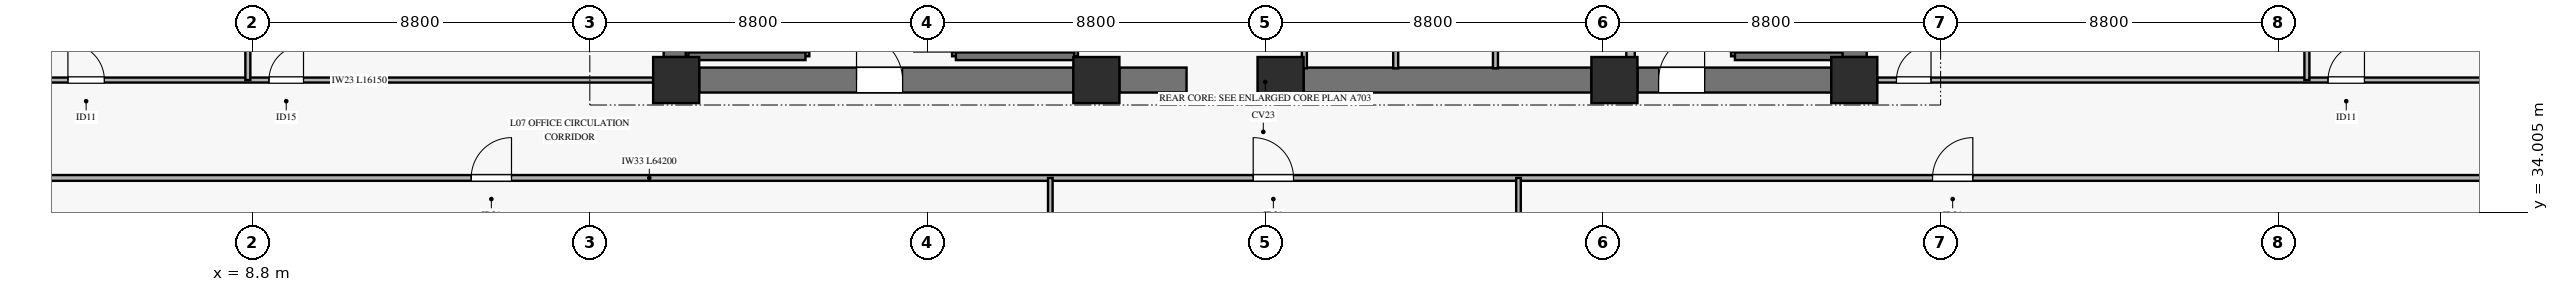
"""IFC4 building model, lengths in metres.
Left out: names, types, materials, properties, quantities, classifications, styles, units other than length and angle.
Written with IfcOpenShell. Run it as: python <this file> out.ifc"""

import sys

from ifc_helpers import new_model, si_unit, direction, frame, frame_2d, origin, origin_2d, place, context, subcontext, project, spatial, rectangle, extrude, source, transform, mapped, element, fill, save


model = new_model("IFC4")
c1 = context("Model", 3, precision=1e-05, world=origin(), true_north=direction((0.0, 1.0)))
c2 = subcontext(c1, "Body", "Model", "MODEL_VIEW")
j1 = project(units=[si_unit("LENGTHUNIT", "METRE"), si_unit("PLANEANGLEUNIT", "RADIAN")], contexts=[c1])
p1 = place(None, origin())
s1 = spatial("IfcSite", under=j1, at=p1, CompositionType="ELEMENT")
p2 = place(p1, origin())
s2 = spatial("IfcBuilding", under=s1, at=p2, CompositionType="ELEMENT")
p3 = place(p2, frame((0.0, 0.0, 29.3)))
s3 = spatial("IfcBuildingStorey", under=s2, at=p3, CompositionType="ELEMENT", Elevation=29.3)
m1 = source(origin(), c2, "Body", "SweptSolid", [
    extrude(rectangle(XDim=1.2, YDim=1.2, at=origin_2d()), origin(), (0.0, 0.0, 1.0), 3.68),
])
for number, where, z_axis, x_axis in (
    (1, (19.85, 37.45, 0.0), (0.0, 0.0, 1.0), (1.0, 0.0, 0.0)),
    (2, (30.8, 37.45, 0.0), (0.0, 0.0, 1.0), (1.0, 0.0, 0.0)),
    (3, (35.6, 37.45, 0.0), (0.0, 0.0, 1.0), (1.0, 0.0, 0.0)),
    (4, (44.3, 37.45, 0.0), (0.0, 0.0, 1.0), (1.0, 0.0, 0.0)),
    (5, (50.55, 37.45, 0.0), (0.0, 0.0, 1.0), (1.0, 0.0, 0.0)),
):
    element("IfcColumn", number, at=place(p3, frame(where, z_axis=z_axis, x_axis=x_axis)), inside=s3, PredefinedType="PILASTER", context=c2, shape_type="MappedRepresentation", body=[
        mapped(m1, transform((0.0, 0.0, 0.0), x_axis=(1.0, 0.0, 0.0), y_axis=(0.0, 1.0, 0.0), z_axis=(0.0, 0.0, 1.0), scale=1.0)),
    ])
p4 = place(p3, frame((20.45, 37.45, 0.0), z_axis=(0.0, 0.0, 1.0), x_axis=(1.0, 0.0, 0.0)))
e6 = element("IfcWall", 6, at=p4, inside=s3, PredefinedType="SHEAR", context=c2, shape_type="SweptSolid", body=[
    extrude(rectangle(XDim=9.75, YDim=0.65, at=frame_2d((4.875, 0.0))), origin(), (0.0, 0.0, 1.0), 3.68),
])
p5 = place(p4, frame((4.1, 0.0, 0.0)))
e7 = element("IfcOpeningElement", 7, at=p5, cuts=e6, PredefinedType="OPENING", context=c2, shape_type="SweptSolid", body=[
    extrude(rectangle(XDim=1.2, YDim=2.15, at=frame_2d((0.6, 1.075))), frame((0.0, 0.335, 0.0), z_axis=(0.0, -1.0, 0.0), x_axis=(1.0, 0.0, 0.0)), (0.0, 0.0, 1.0), 0.67),
])
p6 = place(p3, frame((31.4, 37.45, 0.0), z_axis=(0.0, 0.0, 1.0), x_axis=(1.0, 0.0, 0.0)))
e8 = element("IfcWall", 8, at=p6, inside=s3, PredefinedType="SHEAR", context=c2, shape_type="SweptSolid", body=[
    extrude(rectangle(XDim=1.75, YDim=0.65, at=frame_2d((0.875, 0.0))), origin(), (0.0, 0.0, 1.0), 3.68),
])
p7 = place(p3, frame((36.2, 37.45, 0.0), z_axis=(0.0, 0.0, 1.0), x_axis=(1.0, 0.0, 0.0)))
e9 = element("IfcWall", 9, at=p7, inside=s3, PredefinedType="SHEAR", context=c2, shape_type="SweptSolid", body=[
    extrude(rectangle(XDim=7.5, YDim=0.65, at=frame_2d((3.75, 0.0))), origin(), (0.0, 0.0, 1.0), 3.68),
])
p8 = place(p3, frame((44.9, 37.45, 0.0), z_axis=(0.0, 0.0, 1.0), x_axis=(1.0, 0.0, 0.0)))
e10 = element("IfcWall", 10, at=p8, inside=s3, PredefinedType="SHEAR", context=c2, shape_type="SweptSolid", body=[
    extrude(rectangle(XDim=5.05, YDim=0.65, at=frame_2d((2.525, 0.0))), origin(), (0.0, 0.0, 1.0), 3.68),
])
p9 = place(p8, frame((0.55, 0.0, 0.0)))
e11 = element("IfcOpeningElement", 11, at=p9, cuts=e10, PredefinedType="OPENING", context=c2, shape_type="SweptSolid", body=[
    extrude(rectangle(XDim=1.2, YDim=2.15, at=frame_2d((0.6, 1.075))), frame((0.0, 0.335, 0.0), z_axis=(0.0, -1.0, 0.0), x_axis=(1.0, 0.0, 0.0)), (0.0, 0.0, 1.0), 0.67),
])
for number, where, z_axis, x_axis in (
    (12, (19.85, 38.05, 0.0), (0.0, 0.0, 1.0), (0.0, 1.0, 0.0)),
    (13, (50.55, 38.05, 0.0), (0.0, 0.0, 1.0), (0.0, 1.0, 0.0)),
):
    element("IfcWall", number, at=place(p3, frame(where, z_axis=z_axis, x_axis=x_axis)), inside=s3, PredefinedType="SHEAR", context=c2, shape_type="SweptSolid", body=[
        extrude(rectangle(XDim=7.9, YDim=0.65, at=frame_2d((3.95, 0.0))), origin(), (0.0, 0.0, 1.0), 3.68),
    ])
p10 = place(p3, frame((20.17, 38.07, 0.0), z_axis=(0.0, 0.0, 1.0), x_axis=(0.0, 1.0, 0.0)))
e14 = element("IfcWall", 14, at=p10, inside=s3, PredefinedType="SOLIDWALL", context=c2, shape_type="SweptSolid", body=[
    extrude(rectangle(XDim=7.25, YDim=0.14, at=frame_2d((3.625, 0.0))), origin(), (0.0, 0.0, 1.0), 3.9),
])
p11 = place(p3, frame((23.22, 38.07, 0.0), z_axis=(0.0, 0.0, 1.0), x_axis=(0.0, 1.0, 0.0)))
e15 = element("IfcWall", 15, at=p11, inside=s3, PredefinedType="SOLIDWALL", context=c2, shape_type="SweptSolid", body=[
    extrude(rectangle(XDim=7.25, YDim=0.2, at=frame_2d((3.625, 0.0))), origin(), (0.0, 0.0, 1.0), 3.9),
])
p12 = place(p11, frame((0.11, 0.0, 0.0)))
e16 = element("IfcOpeningElement", 16, at=p12, cuts=e15, PredefinedType="OPENING", context=c2, shape_type="SweptSolid", body=[
    extrude(rectangle(XDim=1.1, YDim=2.15, at=frame_2d((0.55, 1.075))), frame((0.0, 0.11, 0.0), z_axis=(0.0, -1.0, 0.0), x_axis=(1.0, 0.0, 0.0)), (0.0, 0.0, 1.0), 0.22),
])
p13 = place(p3, frame((20.17, 38.07, 0.0), z_axis=(0.0, 0.0, 1.0), x_axis=(1.0, 0.0, 0.0)))
e17 = element("IfcWall", 17, at=p13, inside=s3, PredefinedType="SOLIDWALL", context=c2, shape_type="SweptSolid", body=[
    extrude(rectangle(XDim=3.05, YDim=0.2, at=frame_2d((1.525, 0.0))), origin(), (0.0, 0.0, 1.0), 3.9),
])
p14 = place(p3, frame((27.14, 38.07, 0.0), z_axis=(0.0, 0.0, 1.0), x_axis=(0.0, 1.0, 0.0)))
e18 = element("IfcWall", 18, at=p14, inside=s3, PredefinedType="SOLIDWALL", context=c2, shape_type="SweptSolid", body=[
    extrude(rectangle(XDim=7.25, YDim=0.2, at=frame_2d((3.625, 0.0))), origin(), (0.0, 0.0, 1.0), 3.9),
])
p15 = place(p14, frame((0.11, 0.0, 0.0)))
e19 = element("IfcOpeningElement", 19, at=p15, cuts=e18, PredefinedType="OPENING", context=c2, shape_type="SweptSolid", body=[
    extrude(rectangle(XDim=1.1, YDim=2.15, at=frame_2d((0.55, 1.075))), frame((0.0, 0.11, 0.0), z_axis=(0.0, -1.0, 0.0), x_axis=(1.0, 0.0, 0.0)), (0.0, 0.0, 1.0), 0.22),
])
p16 = place(p3, frame((30.22, 38.07, 0.0), z_axis=(0.0, 0.0, 1.0), x_axis=(0.0, 1.0, 0.0)))
e20 = element("IfcWall", 20, at=p16, inside=s3, PredefinedType="SOLIDWALL", context=c2, shape_type="SweptSolid", body=[
    extrude(rectangle(XDim=7.25, YDim=0.2, at=frame_2d((3.625, 0.0))), origin(), (0.0, 0.0, 1.0), 3.9),
])
p17 = place(p3, frame((27.14, 38.07, 0.0), z_axis=(0.0, 0.0, 1.0), x_axis=(1.0, 0.0, 0.0)))
e21 = element("IfcWall", 21, at=p17, inside=s3, PredefinedType="SOLIDWALL", context=c2, shape_type="SweptSolid", body=[
    extrude(rectangle(XDim=3.08, YDim=0.2, at=frame_2d((1.54, 0.0))), origin(), (0.0, 0.0, 1.0), 3.9),
])
p18 = place(p3, frame((47.44, 38.07, 0.0), z_axis=(0.0, 0.0, 1.0), x_axis=(0.0, 1.0, 0.0)))
e22 = element("IfcWall", 22, at=p18, inside=s3, PredefinedType="SOLIDWALL", context=c2, shape_type="SweptSolid", body=[
    extrude(rectangle(XDim=7.25, YDim=0.2, at=frame_2d((3.625, 0.0))), origin(), (0.0, 0.0, 1.0), 3.9),
])
p19 = place(p18, frame((0.11, 0.0, 0.0)))
e23 = element("IfcOpeningElement", 23, at=p19, cuts=e22, PredefinedType="OPENING", context=c2, shape_type="SweptSolid", body=[
    extrude(rectangle(XDim=1.1, YDim=2.15, at=frame_2d((0.55, 1.075))), frame((0.0, 0.11, 0.0), z_axis=(0.0, -1.0, 0.0), x_axis=(1.0, 0.0, 0.0)), (0.0, 0.0, 1.0), 0.22),
])
p20 = place(p3, frame((47.44, 38.07, 0.0), z_axis=(0.0, 0.0, 1.0), x_axis=(1.0, 0.0, 0.0)))
e24 = element("IfcWall", 24, at=p20, inside=s3, PredefinedType="SOLIDWALL", context=c2, shape_type="SweptSolid", body=[
    extrude(rectangle(XDim=2.805, YDim=0.2, at=frame_2d((1.403, 0.0))), origin(), (0.0, 0.0, 1.0), 3.9),
])
p21 = place(p3, frame((44.72, 37.755, 0.0), z_axis=(0.0, 0.0, 1.0), x_axis=(0.0, 1.0, 0.0)))
e25 = element("IfcWall", 25, at=p21, inside=s3, PredefinedType="SOLIDWALL", context=c2, shape_type="SweptSolid", body=[
    extrude(rectangle(XDim=7.465, YDim=0.22, at=frame_2d((3.732, 0.0))), origin(), (0.0, 0.0, 1.0), 3.68),
])
p22 = place(p3, frame((36.22, 37.755, 0.0), z_axis=(0.0, 0.0, 1.0), x_axis=(0.0, 1.0, 0.0)))
e26 = element("IfcWall", 26, at=p22, inside=s3, PredefinedType="PARTITIONING", context=c2, shape_type="SweptSolid", body=[
    extrude(rectangle(XDim=2.165, YDim=0.13, at=frame_2d((1.083, 0.0))), origin(), (0.0, 0.0, 1.0), 3.68),
])
p23 = place(p22, frame((0.855, 0.0, 0.0)))
e27 = element("IfcOpeningElement", 27, at=p23, cuts=e26, PredefinedType="OPENING", context=c2, shape_type="SweptSolid", body=[
    extrude(rectangle(XDim=0.9, YDim=2.1, at=frame_2d((0.45, 1.05))), frame((0.0, 0.075, 0.0), z_axis=(0.0, -1.0, 0.0), x_axis=(1.0, 0.0, 0.0)), (0.0, 0.0, 1.0), 0.15),
])
p24 = place(p3, frame((38.6, 37.755, 0.0), z_axis=(0.0, 0.0, 1.0), x_axis=(0.0, 1.0, 0.0)))
e28 = element("IfcWall", 28, at=p24, inside=s3, PredefinedType="PARTITIONING", context=c2, shape_type="SweptSolid", body=[
    extrude(rectangle(XDim=2.165, YDim=0.13, at=frame_2d((1.083, 0.0))), origin(), (0.0, 0.0, 1.0), 3.68),
])
p25 = place(p24, frame((0.565, 0.0, 0.0)))
e29 = element("IfcOpeningElement", 29, at=p25, cuts=e28, PredefinedType="OPENING", context=c2, shape_type="SweptSolid", body=[
    extrude(rectangle(XDim=0.9, YDim=2.1, at=frame_2d((0.45, 1.05))), frame((0.0, 0.075, 0.0), z_axis=(0.0, -1.0, 0.0), x_axis=(1.0, 0.0, 0.0)), (0.0, 0.0, 1.0), 0.15),
])
p26 = place(p3, frame((41.2, 37.755, 0.0), z_axis=(0.0, 0.0, 1.0), x_axis=(0.0, 1.0, 0.0)))
e30 = element("IfcWall", 30, at=p26, inside=s3, PredefinedType="PARTITIONING", context=c2, shape_type="SweptSolid", body=[
    extrude(rectangle(XDim=2.165, YDim=0.13, at=frame_2d((1.083, 0.0))), origin(), (0.0, 0.0, 1.0), 3.68),
])
p27 = place(p26, frame((0.565, 0.0, 0.0)))
e31 = element("IfcOpeningElement", 31, at=p27, cuts=e30, PredefinedType="OPENING", context=c2, shape_type="SweptSolid", body=[
    extrude(rectangle(XDim=0.9, YDim=2.1, at=frame_2d((0.45, 1.05))), frame((0.0, 0.075, 0.0), z_axis=(0.0, -1.0, 0.0), x_axis=(1.0, 0.0, 0.0)), (0.0, 0.0, 1.0), 0.15),
])
p28 = place(p3, frame((3.1, 34.9, 0.0), z_axis=(0.0, 0.0, 1.0), x_axis=(1.0, 0.0, 0.0)))
e32 = element("IfcWall", 32, at=p28, inside=s3, PredefinedType="PARTITIONING", context=c2, shape_type="SweptSolid", body=[
    extrude(rectangle(XDim=64.2, YDim=0.15, at=frame_2d((32.1, 0.0))), origin(), (0.0, 0.0, 1.0), 2.765),
])
p29 = place(p28, frame((11.409, 0.0, 0.0)))
e33 = element("IfcOpeningElement", 33, at=p29, cuts=e32, PredefinedType="OPENING", context=c2, shape_type="SweptSolid", body=[
    extrude(rectangle(XDim=1.05, YDim=2.15, at=frame_2d((0.525, 1.075))), frame((0.0, 0.085, 0.0), z_axis=(0.0, -1.0, 0.0), x_axis=(1.0, 0.0, 0.0)), (0.0, 0.0, 1.0), 0.17),
])
p30 = place(p28, frame((31.787, 0.0, 0.0)))
e34 = element("IfcOpeningElement", 34, at=p30, cuts=e32, PredefinedType="OPENING", context=c2, shape_type="SweptSolid", body=[
    extrude(rectangle(XDim=1.05, YDim=2.15, at=frame_2d((0.525, 1.075))), frame((0.0, 0.085, 0.0), z_axis=(0.0, -1.0, 0.0), x_axis=(1.0, 0.0, 0.0)), (0.0, 0.0, 1.0), 0.17),
])
p31 = place(p28, frame((49.489, 0.0, 0.0)))
e35 = element("IfcOpeningElement", 35, at=p31, cuts=e32, PredefinedType="OPENING", context=c2, shape_type="SweptSolid", body=[
    extrude(rectangle(XDim=1.05, YDim=2.15, at=frame_2d((0.525, 1.075))), frame((0.0, 0.085, 0.0), z_axis=(0.0, -1.0, 0.0), x_axis=(1.0, 0.0, 0.0)), (0.0, 0.0, 1.0), 0.17),
])
for number, where, z_axis, x_axis in (
    (36, (29.6, 3.3, 0.0), (0.0, 0.0, 1.0), (0.0, 1.0, 0.0)),
    (37, (41.8, 3.3, 0.0), (0.0, 0.0, 1.0), (0.0, 1.0, 0.0)),
):
    element("IfcWall", number, at=place(p3, frame(where, z_axis=z_axis, x_axis=x_axis)), inside=s3, PredefinedType="PARTITIONING", context=c2, shape_type="SweptSolid", body=[
        extrude(rectangle(XDim=31.6, YDim=0.12, at=frame_2d((15.8, 0.0))), origin(), (0.0, 0.0, 1.0), 3.165),
    ])
p32 = place(p3, frame((3.1, 37.45, 0.0), z_axis=(0.0, 0.0, 1.0), x_axis=(1.0, 0.0, 0.0)))
e38 = element("IfcWall", 38, at=p32, inside=s3, PredefinedType="PARTITIONING", context=c2, shape_type="SweptSolid", body=[
    extrude(rectangle(XDim=16.15, YDim=0.13, at=frame_2d((8.075, 0.0))), origin(), (0.0, 0.0, 1.0), 3.165),
])
p33 = place(p32, frame((0.9, 0.0, 0.0)))
e39 = element("IfcOpeningElement", 39, at=p33, cuts=e38, PredefinedType="OPENING", context=c2, shape_type="SweptSolid", body=[
    extrude(rectangle(XDim=0.95, YDim=2.1, at=frame_2d((0.475, 1.05))), frame((0.0, 0.075, 0.0), z_axis=(0.0, -1.0, 0.0), x_axis=(1.0, 0.0, 0.0)), (0.0, 0.0, 1.0), 0.15),
])
p34 = place(p32, frame((6.139, 0.0, 0.0)))
e40 = element("IfcOpeningElement", 40, at=p34, cuts=e38, PredefinedType="OPENING", context=c2, shape_type="SweptSolid", body=[
    extrude(rectangle(XDim=0.9, YDim=2.1, at=frame_2d((0.45, 1.05))), frame((0.0, 0.075, 0.0), z_axis=(0.0, -1.0, 0.0), x_axis=(1.0, 0.0, 0.0)), (0.0, 0.0, 1.0), 0.15),
])
p35 = place(p3, frame((8.689, 37.45, 0.0), z_axis=(0.0, 0.0, 1.0), x_axis=(0.0, 1.0, 0.0)))
e41 = element("IfcWall", 41, at=p35, inside=s3, PredefinedType="PARTITIONING", context=c2, shape_type="SweptSolid", body=[
    extrude(rectangle(XDim=8.8, YDim=0.13, at=frame_2d((4.4, 0.0))), origin(), (0.0, 0.0, 1.0), 3.68),
])
p36 = place(p3, frame((51.15, 37.45, 0.0), z_axis=(0.0, 0.0, 1.0), x_axis=(1.0, 0.0, 0.0)))
e42 = element("IfcWall", 42, at=p36, inside=s3, PredefinedType="PARTITIONING", context=c2, shape_type="SweptSolid", body=[
    extrude(rectangle(XDim=16.15, YDim=0.13, at=frame_2d((8.075, 0.0))), origin(), (0.0, 0.0, 1.0), 3.165),
])
p37 = place(p36, frame((0.5, 0.0, 0.0)))
e43 = element("IfcOpeningElement", 43, at=p37, cuts=e42, PredefinedType="OPENING", context=c2, shape_type="SweptSolid", body=[
    extrude(rectangle(XDim=0.9, YDim=2.1, at=frame_2d((0.45, 1.05))), frame((0.0, 0.075, 0.0), z_axis=(0.0, -1.0, 0.0), x_axis=(1.0, 0.0, 0.0)), (0.0, 0.0, 1.0), 0.15),
])
p38 = place(p36, frame((11.745, 0.0, 0.0)))
e44 = element("IfcOpeningElement", 44, at=p38, cuts=e42, PredefinedType="OPENING", context=c2, shape_type="SweptSolid", body=[
    extrude(rectangle(XDim=0.95, YDim=2.1, at=frame_2d((0.475, 1.05))), frame((0.0, 0.075, 0.0), z_axis=(0.0, -1.0, 0.0), x_axis=(1.0, 0.0, 0.0)), (0.0, 0.0, 1.0), 0.15),
])
p39 = place(p3, frame((62.345, 37.45, 0.0), z_axis=(0.0, 0.0, 1.0), x_axis=(0.0, 1.0, 0.0)))
e45 = element("IfcWall", 45, at=p39, inside=s3, PredefinedType="PARTITIONING", context=c2, shape_type="SweptSolid", body=[
    extrude(rectangle(XDim=8.8, YDim=0.13, at=frame_2d((4.4, 0.0))), origin(), (0.0, 0.0, 1.0), 3.68),
])
m2 = source(origin(), c2, "Body", "SweptSolid", [
    extrude(rectangle(XDim=1.2, YDim=2.15, at=frame_2d((0.6, 1.075))), frame((0.0, 0.025, 0.0), z_axis=(0.0, -1.0, 0.0), x_axis=(1.0, 0.0, 0.0)), (0.0, 0.0, 1.0), 0.05),
])
p40 = place(p5, origin())
e46 = element("IfcDoor", 46, at=p40, inside=s3, OperationType="SINGLE_SWING_LEFT", PredefinedType="DOOR", context=c2, shape_type="MappedRepresentation", body=[
    mapped(m2, transform((0.0, 0.0, 0.0), x_axis=(1.0, 0.0, 0.0), y_axis=(0.0, 1.0, 0.0), z_axis=(0.0, 0.0, 1.0), scale=1.0)),
])
fill(e7, e46)
p41 = place(p9, origin())
e47 = element("IfcDoor", 47, at=p41, inside=s3, OperationType="SINGLE_SWING_RIGHT", PredefinedType="DOOR", context=c2, shape_type="MappedRepresentation", body=[
    mapped(m2, transform((0.0, 0.0, 0.0), x_axis=(1.0, 0.0, 0.0), y_axis=(0.0, 1.0, 0.0), z_axis=(0.0, 0.0, 1.0), scale=1.0)),
])
fill(e11, e47)
m3 = source(origin(), c2, "Body", "SweptSolid", [
    extrude(rectangle(XDim=1.05, YDim=2.15, at=frame_2d((0.525, 1.075))), frame((0.0, 0.025, 0.0), z_axis=(0.0, -1.0, 0.0), x_axis=(1.0, 0.0, 0.0)), (0.0, 0.0, 1.0), 0.05),
])
p42 = place(p29, origin())
e48 = element("IfcDoor", 48, at=p42, inside=s3, OperationType="SINGLE_SWING_RIGHT", PredefinedType="DOOR", context=c2, shape_type="MappedRepresentation", body=[
    mapped(m3, transform((0.0, 0.0, 0.0), x_axis=(1.0, 0.0, 0.0), y_axis=(0.0, 1.0, 0.0), z_axis=(0.0, 0.0, 1.0), scale=1.0)),
])
fill(e33, e48)
p43 = place(p30, origin())
e49 = element("IfcDoor", 49, at=p43, inside=s3, OperationType="SINGLE_SWING_LEFT", PredefinedType="DOOR", context=c2, shape_type="MappedRepresentation", body=[
    mapped(m3, transform((0.0, 0.0, 0.0), x_axis=(1.0, 0.0, 0.0), y_axis=(0.0, 1.0, 0.0), z_axis=(0.0, 0.0, 1.0), scale=1.0)),
])
fill(e34, e49)
p44 = place(p31, origin())
e50 = element("IfcDoor", 50, at=p44, inside=s3, OperationType="SINGLE_SWING_RIGHT", PredefinedType="DOOR", context=c2, shape_type="MappedRepresentation", body=[
    mapped(m3, transform((0.0, 0.0, 0.0), x_axis=(1.0, 0.0, 0.0), y_axis=(0.0, 1.0, 0.0), z_axis=(0.0, 0.0, 1.0), scale=1.0)),
])
fill(e35, e50)
m4 = source(origin(), c2, "Body", "SweptSolid", [
    extrude(rectangle(XDim=0.95, YDim=2.1, at=frame_2d((0.475, 1.05))), frame((0.0, 0.025, 0.0), z_axis=(0.0, -1.0, 0.0), x_axis=(1.0, 0.0, 0.0)), (0.0, 0.0, 1.0), 0.05),
])
p45 = place(p33, origin())
e51 = element("IfcDoor", 51, at=p45, inside=s3, OperationType="SINGLE_SWING_LEFT", PredefinedType="DOOR", context=c2, shape_type="MappedRepresentation", body=[
    mapped(m4, transform((0.0, 0.0, 0.0), x_axis=(1.0, 0.0, 0.0), y_axis=(0.0, 1.0, 0.0), z_axis=(0.0, 0.0, 1.0), scale=1.0)),
])
fill(e39, e51)
m5 = source(origin(), c2, "Body", "SweptSolid", [
    extrude(rectangle(XDim=0.9, YDim=2.1, at=frame_2d((0.45, 1.05))), frame((0.0, 0.025, 0.0), z_axis=(0.0, -1.0, 0.0), x_axis=(1.0, 0.0, 0.0)), (0.0, 0.0, 1.0), 0.05),
])
p46 = place(p34, origin())
e52 = element("IfcDoor", 52, at=p46, inside=s3, OperationType="SINGLE_SWING_RIGHT", PredefinedType="DOOR", context=c2, shape_type="MappedRepresentation", body=[
    mapped(m5, transform((0.0, 0.0, 0.0), x_axis=(1.0, 0.0, 0.0), y_axis=(0.0, 1.0, 0.0), z_axis=(0.0, 0.0, 1.0), scale=1.0)),
])
fill(e40, e52)
p47 = place(p37, origin())
e53 = element("IfcDoor", 53, at=p47, inside=s3, OperationType="SINGLE_SWING_RIGHT", PredefinedType="DOOR", context=c2, shape_type="MappedRepresentation", body=[
    mapped(m5, transform((0.0, 0.0, 0.0), x_axis=(1.0, 0.0, 0.0), y_axis=(0.0, 1.0, 0.0), z_axis=(0.0, 0.0, 1.0), scale=1.0)),
])
fill(e43, e53)
p48 = place(p38, origin())
e54 = element("IfcDoor", 54, at=p48, inside=s3, OperationType="SINGLE_SWING_RIGHT", PredefinedType="DOOR", context=c2, shape_type="MappedRepresentation", body=[
    mapped(m4, transform((0.0, 0.0, 0.0), x_axis=(1.0, 0.0, 0.0), y_axis=(0.0, 1.0, 0.0), z_axis=(0.0, 0.0, 1.0), scale=1.0)),
])
fill(e44, e54)
save(model, sys.argv[1])
